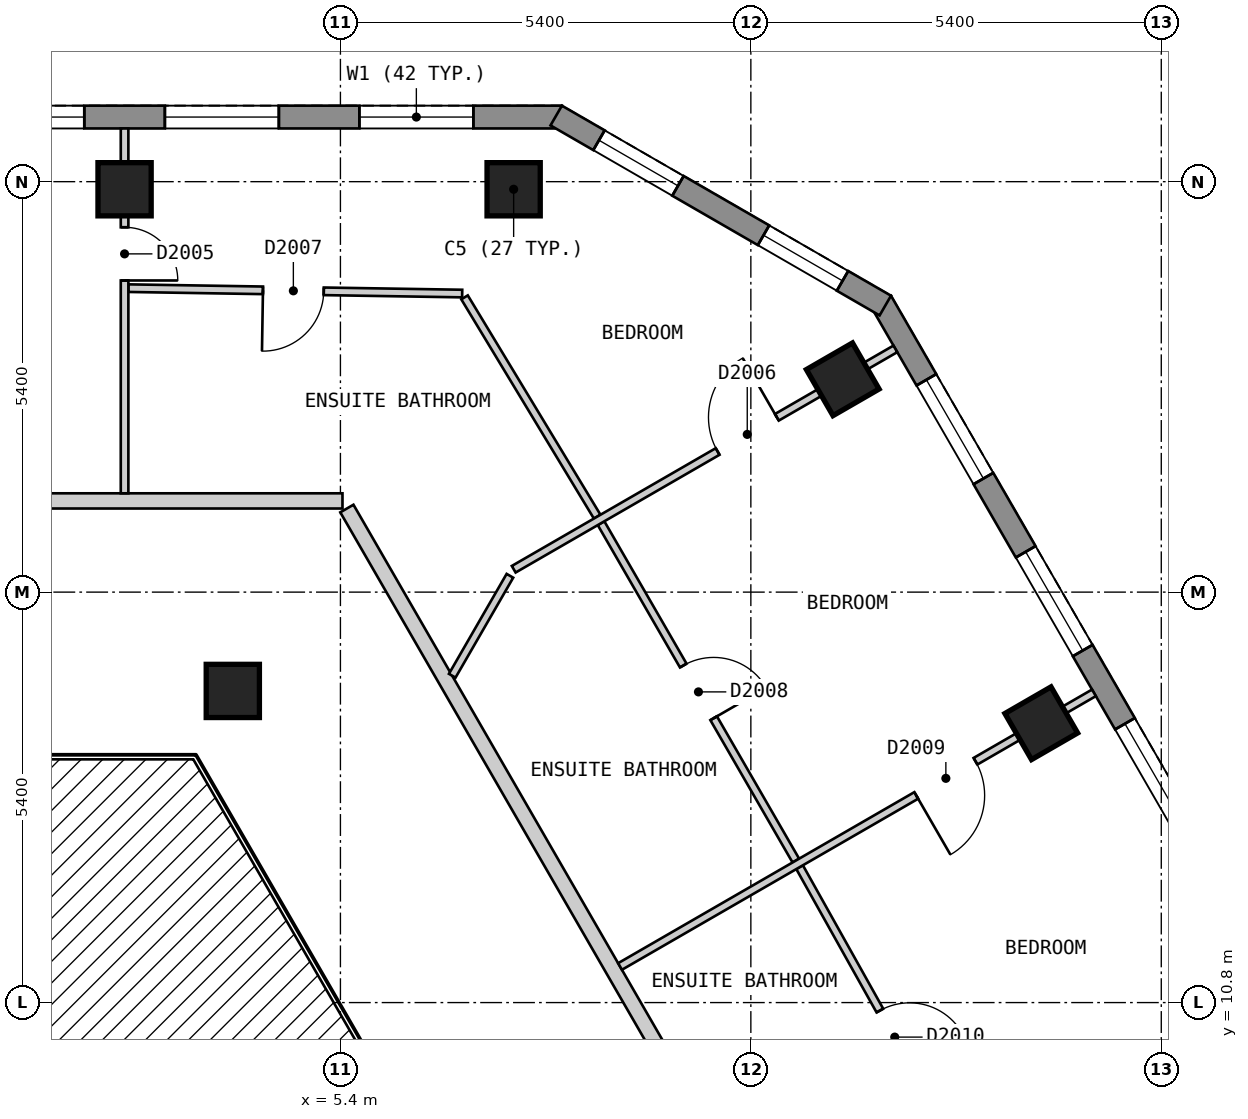
"""IFC4 building model, lengths in metres.
Left out: names, types, materials, properties, quantities, classifications, styles, units other than length and angle.
Written with IfcOpenShell. Run it as: python <this file> out.ifc"""

import sys

from ifc_helpers import new_model, si_unit, direction, frame, frame_2d, origin, origin_2d, place, context, subcontext, project, spatial, polyline, rectangle, outline, extrude, element, fill, save


model = new_model("IFC4")
c1 = context("Model", 3, precision=1e-05, world=origin(), true_north=direction((0.0, 1.0)))
c2 = subcontext(c1, "Body", "Model", "MODEL_VIEW")
j1 = project(units=[si_unit("LENGTHUNIT", "METRE"), si_unit("PLANEANGLEUNIT", "RADIAN")], contexts=[c1])
p1 = place(None, origin())
s1 = spatial("IfcSite", under=j1, at=p1, CompositionType="ELEMENT")
p2 = place(p1, origin())
s2 = spatial("IfcBuilding", under=s1, at=p2, CompositionType="ELEMENT")
p3 = place(p2, frame((0.0, 0.0, 238.8)))
s3 = spatial("IfcBuildingStorey", under=s2, at=p3, CompositionType="ELEMENT", Elevation=238.8)
for number, where, z_axis, x_axis in (
    (1, (7.679, 21.5, 0.0), (0.0, 0.0, 1.0), (-1.0, 0.0, 0.0)),
    (2, (2.56, 21.5, 0.0), (0.0, 0.0, 1.0), (-1.0, 0.0, 0.0)),
    (3, (14.621, 14.475, 0.0), (0.0, 0.0, 1.0), (-0.5, 0.866, 0.0)),
    (4, (12.009, 19.0, 0.0), (0.0, 0.0, 1.0), (-0.5, 0.866, 0.0)),
    (5, (3.984, 14.9, 0.0), (0.0, 0.0, 1.0), (1.0, 0.0, 0.0)),
):
    element("IfcColumn", number, at=place(p3, frame(where, z_axis=z_axis, x_axis=x_axis)), inside=s3, PredefinedType="COLUMN", context=c2, shape_type="SweptSolid", body=[
        extrude(rectangle(XDim=0.7, YDim=0.7, at=origin_2d()), origin(), (0.0, 0.0, 1.0), 3.0),
    ])
p4 = place(p3, frame((8.314, 22.45, 0.0), z_axis=(0.0, 0.0, 1.0), x_axis=(-1.0, 0.0, 0.0)))
e6 = element("IfcWall", 6, at=p4, inside=s3, PredefinedType="SOLIDWALL", context=c2, shape_type="SweptSolid", body=[
    extrude(outline(polyline([(0.0, -0.15), (16.628, -0.15), (16.548, 0.15), (0.08, 0.15), (0.0, -0.15)])), origin(), (0.0, 0.0, 1.0), 2.7),
])
p5 = place(p4, frame((1.165, 0.0, 0.15)))
e7 = element("IfcOpeningElement", 7, at=p5, cuts=e6, PredefinedType="OPENING", context=c2, shape_type="SweptSolid", body=[
    extrude(rectangle(XDim=1.5, YDim=2.1, at=frame_2d((0.75, 1.05))), frame((0.0, 0.16, 0.0), z_axis=(0.0, -1.0, 0.0), x_axis=(1.0, 0.0, 0.0)), (0.0, 0.0, 1.0), 0.32),
])
p6 = place(p4, frame((3.724, 0.0, 0.15)))
e8 = element("IfcOpeningElement", 8, at=p6, cuts=e6, PredefinedType="OPENING", context=c2, shape_type="SweptSolid", body=[
    extrude(rectangle(XDim=1.5, YDim=2.1, at=frame_2d((0.75, 1.05))), frame((0.0, 0.16, 0.0), z_axis=(0.0, -1.0, 0.0), x_axis=(1.0, 0.0, 0.0)), (0.0, 0.0, 1.0), 0.32),
])
p7 = place(p4, frame((6.284, 0.0, 0.15)))
e9 = element("IfcOpeningElement", 9, at=p7, cuts=e6, PredefinedType="OPENING", context=c2, shape_type="SweptSolid", body=[
    extrude(rectangle(XDim=1.5, YDim=2.1, at=frame_2d((0.75, 1.05))), frame((0.0, 0.16, 0.0), z_axis=(0.0, -1.0, 0.0), x_axis=(1.0, 0.0, 0.0)), (0.0, 0.0, 1.0), 0.32),
])
p8 = place(p4, frame((8.843, 0.0, 0.15)))
e10 = element("IfcOpeningElement", 10, at=p8, cuts=e6, PredefinedType="OPENING", context=c2, shape_type="SweptSolid", body=[
    extrude(rectangle(XDim=1.5, YDim=2.1, at=frame_2d((0.75, 1.05))), frame((0.0, 0.16, 0.0), z_axis=(0.0, -1.0, 0.0), x_axis=(1.0, 0.0, 0.0)), (0.0, 0.0, 1.0), 0.32),
])
p9 = place(p4, frame((11.403, 0.0, 0.15)))
e11 = element("IfcOpeningElement", 11, at=p9, cuts=e6, PredefinedType="OPENING", context=c2, shape_type="SweptSolid", body=[
    extrude(rectangle(XDim=1.5, YDim=2.1, at=frame_2d((0.75, 1.05))), frame((0.0, 0.16, 0.0), z_axis=(0.0, -1.0, 0.0), x_axis=(1.0, 0.0, 0.0)), (0.0, 0.0, 1.0), 0.32),
])
p10 = place(p4, frame((13.962, 0.0, 0.15)))
e12 = element("IfcOpeningElement", 12, at=p10, cuts=e6, PredefinedType="OPENING", context=c2, shape_type="SweptSolid", body=[
    extrude(rectangle(XDim=1.5, YDim=2.1, at=frame_2d((0.75, 1.05))), frame((0.0, 0.16, 0.0), z_axis=(0.0, -1.0, 0.0), x_axis=(1.0, 0.0, 0.0)), (0.0, 0.0, 1.0), 0.32),
])
p11 = place(p3, frame((23.599, 0.825, 0.0), z_axis=(0.0, 0.0, 1.0), x_axis=(-0.500003656944, 0.866023292436, 0.0)))
e13 = element("IfcWall", 13, at=p11, inside=s3, PredefinedType="SOLIDWALL", context=c2, shape_type="SweptSolid", body=[
    extrude(outline(polyline([(0.0, -0.15), (22.17, -0.15), (22.09, 0.15), (0.08, 0.15), (0.0, -0.15)])), origin(), (0.0, 0.0, 1.0), 2.7),
])
p12 = place(p11, frame((1.191, 0.0, 0.15)))
e14 = element("IfcOpeningElement", 14, at=p12, cuts=e13, PredefinedType="OPENING", context=c2, shape_type="SweptSolid", body=[
    extrude(rectangle(XDim=1.5, YDim=2.1, at=frame_2d((0.75, 1.05))), frame((0.0, 0.16, 0.0), z_axis=(0.0, -1.0, 0.0), x_axis=(1.0, 0.0, 0.0)), (0.0, 0.0, 1.0), 0.32),
])
p13 = place(p11, frame((3.804, 0.0, 0.15)))
e15 = element("IfcOpeningElement", 15, at=p13, cuts=e13, PredefinedType="OPENING", context=c2, shape_type="SweptSolid", body=[
    extrude(rectangle(XDim=1.5, YDim=2.1, at=frame_2d((0.75, 1.05))), frame((0.0, 0.16, 0.0), z_axis=(0.0, -1.0, 0.0), x_axis=(1.0, 0.0, 0.0)), (0.0, 0.0, 1.0), 0.32),
])
p14 = place(p11, frame((6.417, 0.0, 0.15)))
e16 = element("IfcOpeningElement", 16, at=p14, cuts=e13, PredefinedType="OPENING", context=c2, shape_type="SweptSolid", body=[
    extrude(rectangle(XDim=1.5, YDim=2.1, at=frame_2d((0.75, 1.05))), frame((0.0, 0.16, 0.0), z_axis=(0.0, -1.0, 0.0), x_axis=(1.0, 0.0, 0.0)), (0.0, 0.0, 1.0), 0.32),
])
p15 = place(p11, frame((9.029, 0.0, 0.15)))
e17 = element("IfcOpeningElement", 17, at=p15, cuts=e13, PredefinedType="OPENING", context=c2, shape_type="SweptSolid", body=[
    extrude(rectangle(XDim=1.5, YDim=2.1, at=frame_2d((0.75, 1.05))), frame((0.0, 0.16, 0.0), z_axis=(0.0, -1.0, 0.0), x_axis=(1.0, 0.0, 0.0)), (0.0, 0.0, 1.0), 0.32),
])
p16 = place(p11, frame((11.641, 0.0, 0.15)))
e18 = element("IfcOpeningElement", 18, at=p16, cuts=e13, PredefinedType="OPENING", context=c2, shape_type="SweptSolid", body=[
    extrude(rectangle(XDim=1.5, YDim=2.1, at=frame_2d((0.75, 1.05))), frame((0.0, 0.16, 0.0), z_axis=(0.0, -1.0, 0.0), x_axis=(1.0, 0.0, 0.0)), (0.0, 0.0, 1.0), 0.32),
])
p17 = place(p11, frame((14.254, 0.0, 0.15)))
e19 = element("IfcOpeningElement", 19, at=p17, cuts=e13, PredefinedType="OPENING", context=c2, shape_type="SweptSolid", body=[
    extrude(rectangle(XDim=1.5, YDim=2.1, at=frame_2d((0.75, 1.05))), frame((0.0, 0.16, 0.0), z_axis=(0.0, -1.0, 0.0), x_axis=(1.0, 0.0, 0.0)), (0.0, 0.0, 1.0), 0.32),
])
p18 = place(p11, frame((16.866, 0.0, 0.15)))
e20 = element("IfcOpeningElement", 20, at=p18, cuts=e13, PredefinedType="OPENING", context=c2, shape_type="SweptSolid", body=[
    extrude(rectangle(XDim=1.5, YDim=2.1, at=frame_2d((0.75, 1.05))), frame((0.0, 0.16, 0.0), z_axis=(0.0, -1.0, 0.0), x_axis=(1.0, 0.0, 0.0)), (0.0, 0.0, 1.0), 0.32),
])
p19 = place(p11, frame((19.479, 0.0, 0.15)))
e21 = element("IfcOpeningElement", 21, at=p19, cuts=e13, PredefinedType="OPENING", context=c2, shape_type="SweptSolid", body=[
    extrude(rectangle(XDim=1.5, YDim=2.1, at=frame_2d((0.75, 1.05))), frame((0.0, 0.16, 0.0), z_axis=(0.0, -1.0, 0.0), x_axis=(1.0, 0.0, 0.0)), (0.0, 0.0, 1.0), 0.32),
])
p20 = place(p3, frame((12.569, 19.97, 0.0), z_axis=(0.0, 0.0, 1.0), x_axis=(-0.866022959057, 0.500004234368, 0.0)))
e22 = element("IfcWall", 22, at=p20, inside=s3, PredefinedType="SOLIDWALL", context=c2, shape_type="SweptSolid", body=[
    extrude(outline(polyline([(0.0, -0.15), (5.0, -0.15), (4.92, 0.15), (0.08, 0.15), (0.0, -0.15)])), origin(), (0.0, 0.0, 1.0), 2.7),
])
p21 = place(p20, frame((0.65, 0.0, 0.15)))
e23 = element("IfcOpeningElement", 23, at=p21, cuts=e22, PredefinedType="OPENING", context=c2, shape_type="SweptSolid", body=[
    extrude(rectangle(XDim=1.2, YDim=2.1, at=frame_2d((0.6, 1.05))), frame((0.0, 0.16, 0.0), z_axis=(0.0, -1.0, 0.0), x_axis=(1.0, 0.0, 0.0)), (0.0, 0.0, 1.0), 0.32),
])
p22 = place(p20, frame((3.15, 0.0, 0.15)))
e24 = element("IfcOpeningElement", 24, at=p22, cuts=e22, PredefinedType="OPENING", context=c2, shape_type="SweptSolid", body=[
    extrude(rectangle(XDim=1.2, YDim=2.1, at=frame_2d((0.6, 1.05))), frame((0.0, 0.16, 0.0), z_axis=(0.0, -1.0, 0.0), x_axis=(1.0, 0.0, 0.0)), (0.0, 0.0, 1.0), 0.32),
])
p23 = place(p3, frame((5.485, 17.3, 0.0), z_axis=(0.0, 0.0, 1.0), x_axis=(0.499943285704, -0.866058145322, 0.0)))
e25 = element("IfcWall", 25, at=p23, inside=s3, PredefinedType="PARTITIONING", context=c2, shape_type="SweptSolid", body=[
    extrude(rectangle(XDim=10.623, YDim=0.2, at=frame_2d((5.312, 0.0))), origin(), (0.0, 0.0, 1.0), 2.7),
])
p24 = place(p3, frame((-5.312, 17.4, 0.0), z_axis=(0.0, 0.0, 1.0), x_axis=(1.0, 0.0, 0.0)))
e26 = element("IfcWall", 26, at=p24, inside=s3, PredefinedType="PARTITIONING", context=c2, shape_type="SweptSolid", body=[
    extrude(rectangle(XDim=10.739, YDim=0.2, at=frame_2d((5.37, 0.0))), origin(), (0.0, 0.0, 1.0), 2.7),
])
p25 = place(p24, frame((0.311, 0.0, 0.0)))
e27 = element("IfcOpeningElement", 27, at=p25, cuts=e26, PredefinedType="OPENING", context=c2, shape_type="SweptSolid", body=[
    extrude(rectangle(XDim=1.0, YDim=2.1, at=frame_2d((0.5, 1.05))), frame((0.0, 0.11, 0.0), z_axis=(0.0, -1.0, 0.0), x_axis=(1.0, 0.0, 0.0)), (0.0, 0.0, 1.0), 0.22),
])
p26 = place(p3, frame((7.033, 20.078, 0.0), z_axis=(0.0, 0.0, 1.0), x_axis=(0.517601834362, -0.855621610915, 0.0)))
e28 = element("IfcWall", 28, at=p26, inside=s3, PredefinedType="PARTITIONING", context=c2, shape_type="SweptSolid", body=[
    extrude(rectangle(XDim=3.372, YDim=0.1, at=frame_2d((1.686, 0.0))), origin(), (0.0, 0.0, 1.0), 2.7),
])
p27 = place(p3, frame((8.829, 17.107, 0.0), z_axis=(0.0, 0.0, 1.0), x_axis=(0.500022055211, -0.866012669828, 0.0)))
e29 = element("IfcWall", 29, at=p27, inside=s3, PredefinedType="PARTITIONING", context=c2, shape_type="SweptSolid", body=[
    extrude(rectangle(XDim=5.126, YDim=0.1, at=frame_2d((2.563, 0.0))), origin(), (0.0, 0.0, 1.0), 2.7),
])
p28 = place(p27, frame((2.163, 0.0, 0.0)))
e30 = element("IfcOpeningElement", 30, at=p28, cuts=e29, PredefinedType="OPENING", context=c2, shape_type="SweptSolid", body=[
    extrude(rectangle(XDim=0.8, YDim=2.1, at=frame_2d((0.4, 1.05))), frame((0.0, 0.06, 0.0), z_axis=(0.0, -1.0, 0.0), x_axis=(1.0, 0.0, 0.0)), (0.0, 0.0, 1.0), 0.12),
])
p29 = place(p3, frame((11.441, 12.582, 0.0), z_axis=(0.0, 0.0, 1.0), x_axis=(0.488568218554, -0.872525699231, 0.0)))
e31 = element("IfcWall", 31, at=p29, inside=s3, PredefinedType="PARTITIONING", context=c2, shape_type="SweptSolid", body=[
    extrude(rectangle(XDim=5.076, YDim=0.1, at=frame_2d((2.538, 0.0))), origin(), (0.0, 0.0, 1.0), 2.7),
])
p30 = place(p29, frame((2.163, 0.0, 0.0)))
e32 = element("IfcOpeningElement", 32, at=p30, cuts=e31, PredefinedType="OPENING", context=c2, shape_type="SweptSolid", body=[
    extrude(rectangle(XDim=0.8, YDim=2.1, at=frame_2d((0.4, 1.05))), frame((0.0, 0.06, 0.0), z_axis=(0.0, -1.0, 0.0), x_axis=(1.0, 0.0, 0.0)), (0.0, 0.0, 1.0), 0.12),
])
p31 = place(p3, frame((2.61, 20.199, 0.0), z_axis=(0.0, 0.0, 1.0), x_axis=(0.99986918525, -0.016174436206, 0.0)))
e33 = element("IfcWall", 33, at=p31, inside=s3, PredefinedType="PARTITIONING", context=c2, shape_type="SweptSolid", body=[
    extrude(rectangle(XDim=4.392, YDim=0.1, at=frame_2d((2.196, 0.0))), origin(), (0.0, 0.0, 1.0), 2.7),
])
p32 = place(p31, frame((1.771, 0.0, 0.0)))
e34 = element("IfcOpeningElement", 34, at=p32, cuts=e33, PredefinedType="OPENING", context=c2, shape_type="SweptSolid", body=[
    extrude(rectangle(XDim=0.8, YDim=2.1, at=frame_2d((0.4, 1.05))), frame((0.0, 0.06, 0.0), z_axis=(0.0, -1.0, 0.0), x_axis=(1.0, 0.0, 0.0)), (0.0, 0.0, 1.0), 0.12),
])
p33 = place(p3, frame((6.871, 15.1, 0.0), z_axis=(0.0, 0.0, 1.0), x_axis=(0.499805980977, 0.866137391745, 0.0)))
e35 = element("IfcWall", 35, at=p33, inside=s3, PredefinedType="PARTITIONING", context=c2, shape_type="SweptSolid", body=[
    extrude(rectangle(XDim=1.518, YDim=0.1, at=frame_2d((0.759, 0.0))), origin(), (0.0, 0.0, 1.0), 2.7),
])
p34 = place(p3, frame((2.56, 17.5, 0.0), z_axis=(0.0, 0.0, 1.0), x_axis=(0.0, 1.0, 0.0)))
e36 = element("IfcWall", 36, at=p34, inside=s3, PredefinedType="PARTITIONING", context=c2, shape_type="SweptSolid", body=[
    extrude(rectangle(XDim=4.8, YDim=0.1, at=frame_2d((2.4, 0.0))), origin(), (0.0, 0.0, 1.0), 2.7),
])
p35 = place(p34, frame((2.8, 0.0, 0.0)))
e37 = element("IfcOpeningElement", 37, at=p35, cuts=e36, PredefinedType="OPENING", context=c2, shape_type="SweptSolid", body=[
    extrude(rectangle(XDim=0.7, YDim=2.1, at=frame_2d((0.35, 1.05))), frame((0.0, 0.06, 0.0), z_axis=(0.0, -1.0, 0.0), x_axis=(1.0, 0.0, 0.0)), (0.0, 0.0, 1.0), 0.12),
])
p36 = place(p3, frame((9.079, 11.275, 0.0), z_axis=(0.0, 0.0, 1.0), x_axis=(0.866001485781, 0.500041424909, 0.0)))
e38 = element("IfcWall", 38, at=p36, inside=s3, PredefinedType="PARTITIONING", context=c2, shape_type="SweptSolid", body=[
    extrude(rectangle(XDim=7.2, YDim=0.1, at=frame_2d((3.6, 0.0))), origin(), (0.0, 0.0, 1.0), 2.7),
])
p37 = place(p36, frame((4.5, 0.0, 0.0)))
e39 = element("IfcOpeningElement", 39, at=p37, cuts=e38, PredefinedType="OPENING", context=c2, shape_type="SweptSolid", body=[
    extrude(rectangle(XDim=0.9, YDim=2.1, at=frame_2d((0.45, 1.05))), frame((0.0, 0.06, 0.0), z_axis=(0.0, -1.0, 0.0), x_axis=(1.0, 0.0, 0.0)), (0.0, 0.0, 1.0), 0.12),
])
p38 = place(p3, frame((7.68, 16.501, 0.0), z_axis=(0.0, 0.0, 1.0), x_axis=(0.86602149507, 0.500006770031, 0.0)))
e40 = element("IfcWall", 40, at=p38, inside=s3, PredefinedType="PARTITIONING", context=c2, shape_type="SweptSolid", body=[
    extrude(rectangle(XDim=5.798, YDim=0.1, at=frame_2d((2.899, 0.0))), origin(), (0.0, 0.0, 1.0), 2.7),
])
p39 = place(p38, frame((3.098, 0.0, 0.0)))
e41 = element("IfcOpeningElement", 41, at=p39, cuts=e40, PredefinedType="OPENING", context=c2, shape_type="SweptSolid", body=[
    extrude(rectangle(XDim=0.9, YDim=2.1, at=frame_2d((0.45, 1.05))), frame((0.0, 0.06, 0.0), z_axis=(0.0, -1.0, 0.0), x_axis=(1.0, 0.0, 0.0)), (0.0, 0.0, 1.0), 0.12),
])
p40 = place(p3, frame((9.354, 5.401, 0.0), z_axis=(0.0, 0.0, 1.0), x_axis=(0.866018411306, 0.500012111133, 0.0)))
e42 = element("IfcWall", 42, at=p40, inside=s3, PredefinedType="PARTITIONING", context=c2, shape_type="SweptSolid", body=[
    extrude(rectangle(XDim=9.898, YDim=0.2, at=frame_2d((4.949, 0.0))), origin(), (0.0, 0.0, 1.0), 2.7),
])
p41 = place(p5, origin())
e43 = element("IfcWindow", 43, at=p41, inside=s3, PartitioningType="SINGLE_PANEL", PredefinedType="WINDOW", context=c2, shape_type="SweptSolid", body=[
    extrude(rectangle(XDim=1.5, YDim=2.1, at=frame_2d((0.75, 1.05))), frame((0.0, 0.03, 0.0), z_axis=(0.0, -1.0, 0.0), x_axis=(1.0, 0.0, 0.0)), (0.0, 0.0, 1.0), 0.06),
])
fill(e7, e43)
p42 = place(p6, origin())
e44 = element("IfcWindow", 44, at=p42, inside=s3, PartitioningType="SINGLE_PANEL", PredefinedType="WINDOW", context=c2, shape_type="SweptSolid", body=[
    extrude(rectangle(XDim=1.5, YDim=2.1, at=frame_2d((0.75, 1.05))), frame((0.0, 0.03, 0.0), z_axis=(0.0, -1.0, 0.0), x_axis=(1.0, 0.0, 0.0)), (0.0, 0.0, 1.0), 0.06),
])
fill(e8, e44)
p43 = place(p7, origin())
e45 = element("IfcWindow", 45, at=p43, inside=s3, PartitioningType="SINGLE_PANEL", PredefinedType="WINDOW", context=c2, shape_type="SweptSolid", body=[
    extrude(rectangle(XDim=1.5, YDim=2.1, at=frame_2d((0.75, 1.05))), frame((0.0, 0.03, 0.0), z_axis=(0.0, -1.0, 0.0), x_axis=(1.0, 0.0, 0.0)), (0.0, 0.0, 1.0), 0.06),
])
fill(e9, e45)
p44 = place(p17, origin())
e46 = element("IfcWindow", 46, at=p44, inside=s3, PartitioningType="SINGLE_PANEL", PredefinedType="WINDOW", context=c2, shape_type="SweptSolid", body=[
    extrude(rectangle(XDim=1.5, YDim=2.1, at=frame_2d((0.75, 1.05))), frame((0.0, 0.03, 0.0), z_axis=(0.0, -1.0, 0.0), x_axis=(1.0, 0.0, 0.0)), (0.0, 0.0, 1.0), 0.06),
])
fill(e19, e46)
p45 = place(p18, origin())
e47 = element("IfcWindow", 47, at=p45, inside=s3, PartitioningType="SINGLE_PANEL", PredefinedType="WINDOW", context=c2, shape_type="SweptSolid", body=[
    extrude(rectangle(XDim=1.5, YDim=2.1, at=frame_2d((0.75, 1.05))), frame((0.0, 0.03, 0.0), z_axis=(0.0, -1.0, 0.0), x_axis=(1.0, 0.0, 0.0)), (0.0, 0.0, 1.0), 0.06),
])
fill(e20, e47)
p46 = place(p19, origin())
e48 = element("IfcWindow", 48, at=p46, inside=s3, PartitioningType="SINGLE_PANEL", PredefinedType="WINDOW", context=c2, shape_type="SweptSolid", body=[
    extrude(rectangle(XDim=1.5, YDim=2.1, at=frame_2d((0.75, 1.05))), frame((0.0, 0.03, 0.0), z_axis=(0.0, -1.0, 0.0), x_axis=(1.0, 0.0, 0.0)), (0.0, 0.0, 1.0), 0.06),
])
fill(e21, e48)
p47 = place(p21, origin())
e49 = element("IfcWindow", 49, at=p47, inside=s3, PartitioningType="SINGLE_PANEL", PredefinedType="WINDOW", context=c2, shape_type="SweptSolid", body=[
    extrude(rectangle(XDim=1.2, YDim=2.1, at=frame_2d((0.6, 1.05))), frame((0.0, 0.03, 0.0), z_axis=(0.0, -1.0, 0.0), x_axis=(1.0, 0.0, 0.0)), (0.0, 0.0, 1.0), 0.06),
])
fill(e23, e49)
p48 = place(p22, origin())
e50 = element("IfcWindow", 50, at=p48, inside=s3, PartitioningType="SINGLE_PANEL", PredefinedType="WINDOW", context=c2, shape_type="SweptSolid", body=[
    extrude(rectangle(XDim=1.2, YDim=2.1, at=frame_2d((0.6, 1.05))), frame((0.0, 0.03, 0.0), z_axis=(0.0, -1.0, 0.0), x_axis=(1.0, 0.0, 0.0)), (0.0, 0.0, 1.0), 0.06),
])
fill(e24, e50)
p49 = place(p35, origin())
e51 = element("IfcDoor", 51, at=p49, inside=s3, OperationType="SINGLE_SWING_LEFT", PredefinedType="DOOR", context=c2, shape_type="SweptSolid", body=[
    extrude(rectangle(XDim=0.7, YDim=2.1, at=frame_2d((0.35, 1.05))), frame((0.0, 0.025, 0.0), z_axis=(0.0, -1.0, 0.0), x_axis=(1.0, 0.0, 0.0)), (0.0, 0.0, 1.0), 0.05),
])
fill(e37, e51)
p50 = place(p39, origin())
e52 = element("IfcDoor", 52, at=p50, inside=s3, OperationType="SINGLE_SWING_RIGHT", PredefinedType="DOOR", context=c2, shape_type="SweptSolid", body=[
    extrude(rectangle(XDim=0.9, YDim=2.1, at=frame_2d((0.45, 1.05))), frame((0.0, 0.025, 0.0), z_axis=(0.0, -1.0, 0.0), x_axis=(1.0, 0.0, 0.0)), (0.0, 0.0, 1.0), 0.05),
])
fill(e41, e52)
p51 = place(p32, origin())
e53 = element("IfcDoor", 53, at=p51, inside=s3, OperationType="SINGLE_SWING_LEFT", PredefinedType="DOOR", context=c2, shape_type="SweptSolid", body=[
    extrude(rectangle(XDim=0.8, YDim=2.1, at=frame_2d((0.4, 1.05))), frame((0.0, 0.025, 0.0), z_axis=(0.0, -1.0, 0.0), x_axis=(1.0, 0.0, 0.0)), (0.0, 0.0, 1.0), 0.05),
])
fill(e34, e53)
p52 = place(p28, origin())
e54 = element("IfcDoor", 54, at=p52, inside=s3, OperationType="SINGLE_SWING_RIGHT", PredefinedType="DOOR", context=c2, shape_type="SweptSolid", body=[
    extrude(rectangle(XDim=0.8, YDim=2.1, at=frame_2d((0.4, 1.05))), frame((0.0, 0.025, 0.0), z_axis=(0.0, -1.0, 0.0), x_axis=(1.0, 0.0, 0.0)), (0.0, 0.0, 1.0), 0.05),
])
fill(e30, e54)
p53 = place(p37, origin())
e55 = element("IfcDoor", 55, at=p53, inside=s3, OperationType="SINGLE_SWING_LEFT", PredefinedType="DOOR", context=c2, shape_type="SweptSolid", body=[
    extrude(rectangle(XDim=0.9, YDim=2.1, at=frame_2d((0.45, 1.05))), frame((0.0, 0.025, 0.0), z_axis=(0.0, -1.0, 0.0), x_axis=(1.0, 0.0, 0.0)), (0.0, 0.0, 1.0), 0.05),
])
fill(e39, e55)
p54 = place(p30, origin())
e56 = element("IfcDoor", 56, at=p54, inside=s3, OperationType="SINGLE_SWING_RIGHT", PredefinedType="DOOR", context=c2, shape_type="SweptSolid", body=[
    extrude(rectangle(XDim=0.8, YDim=2.1, at=frame_2d((0.4, 1.05))), frame((0.0, 0.025, 0.0), z_axis=(0.0, -1.0, 0.0), x_axis=(1.0, 0.0, 0.0)), (0.0, 0.0, 1.0), 0.05),
])
fill(e32, e56)
save(model, sys.argv[1])
